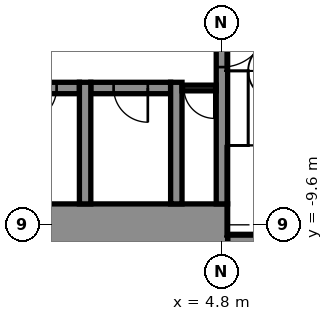
"""IFC4 building model, lengths in metres.
Left out: names, types, materials, properties, quantities, classifications, styles, units other than length and angle.
Written with IfcOpenShell. Run it as: python <this file> out.ifc"""

import sys

from ifc_helpers import new_model, si_unit, direction, frame, frame_2d, origin, place, context, subcontext, project, spatial, rectangle, extrude, element, fill, save


model = new_model("IFC4")
c1 = context("Model", 3, precision=1e-05, world=origin(), true_north=direction((0.0, 1.0)))
c2 = subcontext(c1, "Body", "Model", "MODEL_VIEW")
j1 = project(units=[si_unit("LENGTHUNIT", "METRE"), si_unit("PLANEANGLEUNIT", "RADIAN")], contexts=[c1])
p1 = place(None, origin())
s1 = spatial("IfcSite", under=j1, at=p1, CompositionType="ELEMENT")
p2 = place(p1, origin())
s2 = spatial("IfcBuilding", under=s1, at=p2, CompositionType="ELEMENT")
p3 = place(p2, frame((0.0, 0.0, 66.4)))
s3 = spatial("IfcBuildingStorey", under=s2, at=p3, CompositionType="ELEMENT", Elevation=66.4)
p4 = place(p3, frame((4.95, -10.0, -0.3), z_axis=(0.0, 0.0, 1.0), x_axis=(1.0, 0.0, 0.0)))
e1 = element("IfcWall", 1, at=p4, inside=s3, PredefinedType="STANDARD", context=c2, shape_type="SweptSolid", body=[
    extrude(rectangle(XDim=4.1, YDim=0.3, at=frame_2d((2.05, 0.0))), origin(), (0.0, 0.0, 1.0), 5.5),
])
p5 = place(p3, frame((-5.25, -9.6, -0.3), z_axis=(0.0, 0.0, 1.0), x_axis=(1.0, 0.0, 0.0)))
e2 = element("IfcWall", 2, at=p5, inside=s3, PredefinedType="SHEAR", context=c2, shape_type="SweptSolid", body=[
    extrude(rectangle(XDim=10.2, YDim=1.1, at=frame_2d((5.1, 0.0))), origin(), (0.0, 0.0, 1.0), 5.5),
])
p6 = place(p5, frame((0.6, 0.0, 0.3)))
e3 = element("IfcOpeningElement", 3, at=p6, cuts=e2, PredefinedType="OPENING", context=c2, shape_type="SweptSolid", body=[
    extrude(rectangle(XDim=0.9, YDim=2.1, at=frame_2d((0.45, 1.05))), frame((0.0, 0.56, 0.0), z_axis=(0.0, -1.0, 0.0), x_axis=(1.0, 0.0, 0.0)), (0.0, 0.0, 1.0), 1.12),
])
p7 = place(p3, frame((-1.05, -6.0, -0.3), z_axis=(0.0, 0.0, 1.0), x_axis=(1.0, 0.0, 0.0)))
e4 = element("IfcWall", 4, at=p7, inside=s3, PredefinedType="STANDARD", context=c2, shape_type="SweptSolid", body=[
    extrude(rectangle(XDim=2.1, YDim=0.3, at=frame_2d((1.05, 0.0))), origin(), (0.0, 0.0, 1.0), 5.5),
])
p8 = place(p7, frame((0.6, 0.0, 0.3)))
e5 = element("IfcOpeningElement", 5, at=p8, cuts=e4, PredefinedType="OPENING", context=c2, shape_type="SweptSolid", body=[
    extrude(rectangle(XDim=0.9, YDim=2.1, at=frame_2d((0.45, 1.05))), frame((0.0, 0.16, 0.0), z_axis=(0.0, -1.0, 0.0), x_axis=(1.0, 0.0, 0.0)), (0.0, 0.0, 1.0), 0.32),
])
p9 = place(p3, frame((1.35, -6.0, -0.3), z_axis=(0.0, 0.0, 1.0), x_axis=(1.0, 0.0, 0.0)))
e6 = element("IfcWall", 6, at=p9, inside=s3, PredefinedType="STANDARD", context=c2, shape_type="SweptSolid", body=[
    extrude(rectangle(XDim=2.1, YDim=0.3, at=frame_2d((1.05, 0.0))), origin(), (0.0, 0.0, 1.0), 5.5),
])
p10 = place(p9, frame((0.6, 0.0, 0.3)))
e7 = element("IfcOpeningElement", 7, at=p10, cuts=e6, PredefinedType="OPENING", context=c2, shape_type="SweptSolid", body=[
    extrude(rectangle(XDim=0.9, YDim=2.1, at=frame_2d((0.45, 1.05))), frame((0.0, 0.16, 0.0), z_axis=(0.0, -1.0, 0.0), x_axis=(1.0, 0.0, 0.0)), (0.0, 0.0, 1.0), 0.32),
])
for number, where, z_axis, x_axis in (
    (8, (1.2, -9.05, -0.3), (0.0, 0.0, 1.0), (0.0, 1.0, 0.0)),
    (9, (3.6, -9.05, -0.3), (0.0, 0.0, 1.0), (0.0, 1.0, 0.0)),
):
    element("IfcWall", number, at=place(p3, frame(where, z_axis=z_axis, x_axis=x_axis)), inside=s3, PredefinedType="STANDARD", context=c2, shape_type="SweptSolid", body=[
        extrude(rectangle(XDim=3.2, YDim=0.3, at=frame_2d((1.6, 0.0))), origin(), (0.0, 0.0, 1.0), 5.5),
    ])
p11 = place(p3, frame((4.8, -9.05, -0.3), z_axis=(0.0, 0.0, 1.0), x_axis=(0.0, 1.0, 0.0)))
e10 = element("IfcWall", 10, at=p11, inside=s3, PredefinedType="STANDARD", context=c2, shape_type="SweptSolid", body=[
    extrude(rectangle(XDim=6.8, YDim=0.3, at=frame_2d((3.4, 0.0))), origin(), (0.0, 0.0, 1.0), 5.5),
])
p12 = place(p11, frame((3.6, 0.0, 0.3)))
e11 = element("IfcOpeningElement", 11, at=p12, cuts=e10, PredefinedType="OPENING", context=c2, shape_type="SweptSolid", body=[
    extrude(rectangle(XDim=1.2, YDim=2.1, at=frame_2d((0.6, 1.05))), frame((0.0, 0.16, 0.0), z_axis=(0.0, -1.0, 0.0), x_axis=(1.0, 0.0, 0.0)), (0.0, 0.0, 1.0), 0.32),
])
p13 = place(p3, frame((3.75, -6.0, 0.0), z_axis=(0.0, 0.0, 1.0), x_axis=(1.0, 0.0, 0.0)))
e12 = element("IfcWall", 12, at=p13, inside=s3, PredefinedType="PARTITIONING", context=c2, shape_type="SweptSolid", body=[
    extrude(rectangle(XDim=0.9, YDim=0.15, at=frame_2d((0.45, 0.0))), origin(), (0.0, 0.0, 1.0), 5.2),
])
p14 = place(p13, frame((0.05, 0.0, 0.0)))
e13 = element("IfcOpeningElement", 13, at=p14, cuts=e12, PredefinedType="OPENING", context=c2, shape_type="SweptSolid", body=[
    extrude(rectangle(XDim=0.8, YDim=2.1, at=frame_2d((0.4, 1.05))), frame((0.0, 0.085, 0.0), z_axis=(0.0, -1.0, 0.0), x_axis=(1.0, 0.0, 0.0)), (0.0, 0.0, 1.0), 0.17),
])
p15 = place(p14, frame((0.8, 0.0, 0.0), z_axis=(0.0, 0.0, 1.0), x_axis=(-1.0, 0.0, 0.0)))
e14 = element("IfcDoor", 14, at=p15, inside=s3, OperationType="SINGLE_SWING_RIGHT", PredefinedType="DOOR", context=c2, shape_type="SweptSolid", body=[
    extrude(rectangle(XDim=0.8, YDim=2.1, at=frame_2d((0.4, 1.05))), frame((0.0, 0.025, 0.0), z_axis=(0.0, -1.0, 0.0), x_axis=(1.0, 0.0, 0.0)), (0.0, 0.0, 1.0), 0.05),
])
fill(e13, e14)
p16 = place(p12, frame((1.2, 0.0, 0.0), z_axis=(0.0, 0.0, 1.0), x_axis=(-1.0, 0.0, 0.0)))
e15 = element("IfcDoor", 15, at=p16, inside=s3, OperationType="SINGLE_SWING_RIGHT", PredefinedType="DOOR", context=c2, shape_type="SweptSolid", body=[
    extrude(rectangle(XDim=1.2, YDim=2.1, at=frame_2d((0.6, 1.05))), frame((0.0, 0.025, 0.0), z_axis=(0.0, -1.0, 0.0), x_axis=(1.0, 0.0, 0.0)), (0.0, 0.0, 1.0), 0.05),
])
fill(e11, e15)
p17 = place(p8, frame((0.9, 0.0, 0.0), z_axis=(0.0, 0.0, 1.0), x_axis=(-1.0, 0.0, 0.0)))
e16 = element("IfcDoor", 16, at=p17, inside=s3, OperationType="SINGLE_SWING_LEFT", PredefinedType="DOOR", context=c2, shape_type="SweptSolid", body=[
    extrude(rectangle(XDim=0.9, YDim=2.1, at=frame_2d((0.45, 1.05))), frame((0.0, 0.025, 0.0), z_axis=(0.0, -1.0, 0.0), x_axis=(1.0, 0.0, 0.0)), (0.0, 0.0, 1.0), 0.05),
])
fill(e5, e16)
p18 = place(p10, frame((0.9, 0.0, 0.0), z_axis=(0.0, 0.0, 1.0), x_axis=(-1.0, 0.0, 0.0)))
e17 = element("IfcDoor", 17, at=p18, inside=s3, OperationType="SINGLE_SWING_RIGHT", PredefinedType="DOOR", context=c2, shape_type="SweptSolid", body=[
    extrude(rectangle(XDim=0.9, YDim=2.1, at=frame_2d((0.45, 1.05))), frame((0.0, 0.025, 0.0), z_axis=(0.0, -1.0, 0.0), x_axis=(1.0, 0.0, 0.0)), (0.0, 0.0, 1.0), 0.05),
])
fill(e7, e17)
save(model, sys.argv[1])
